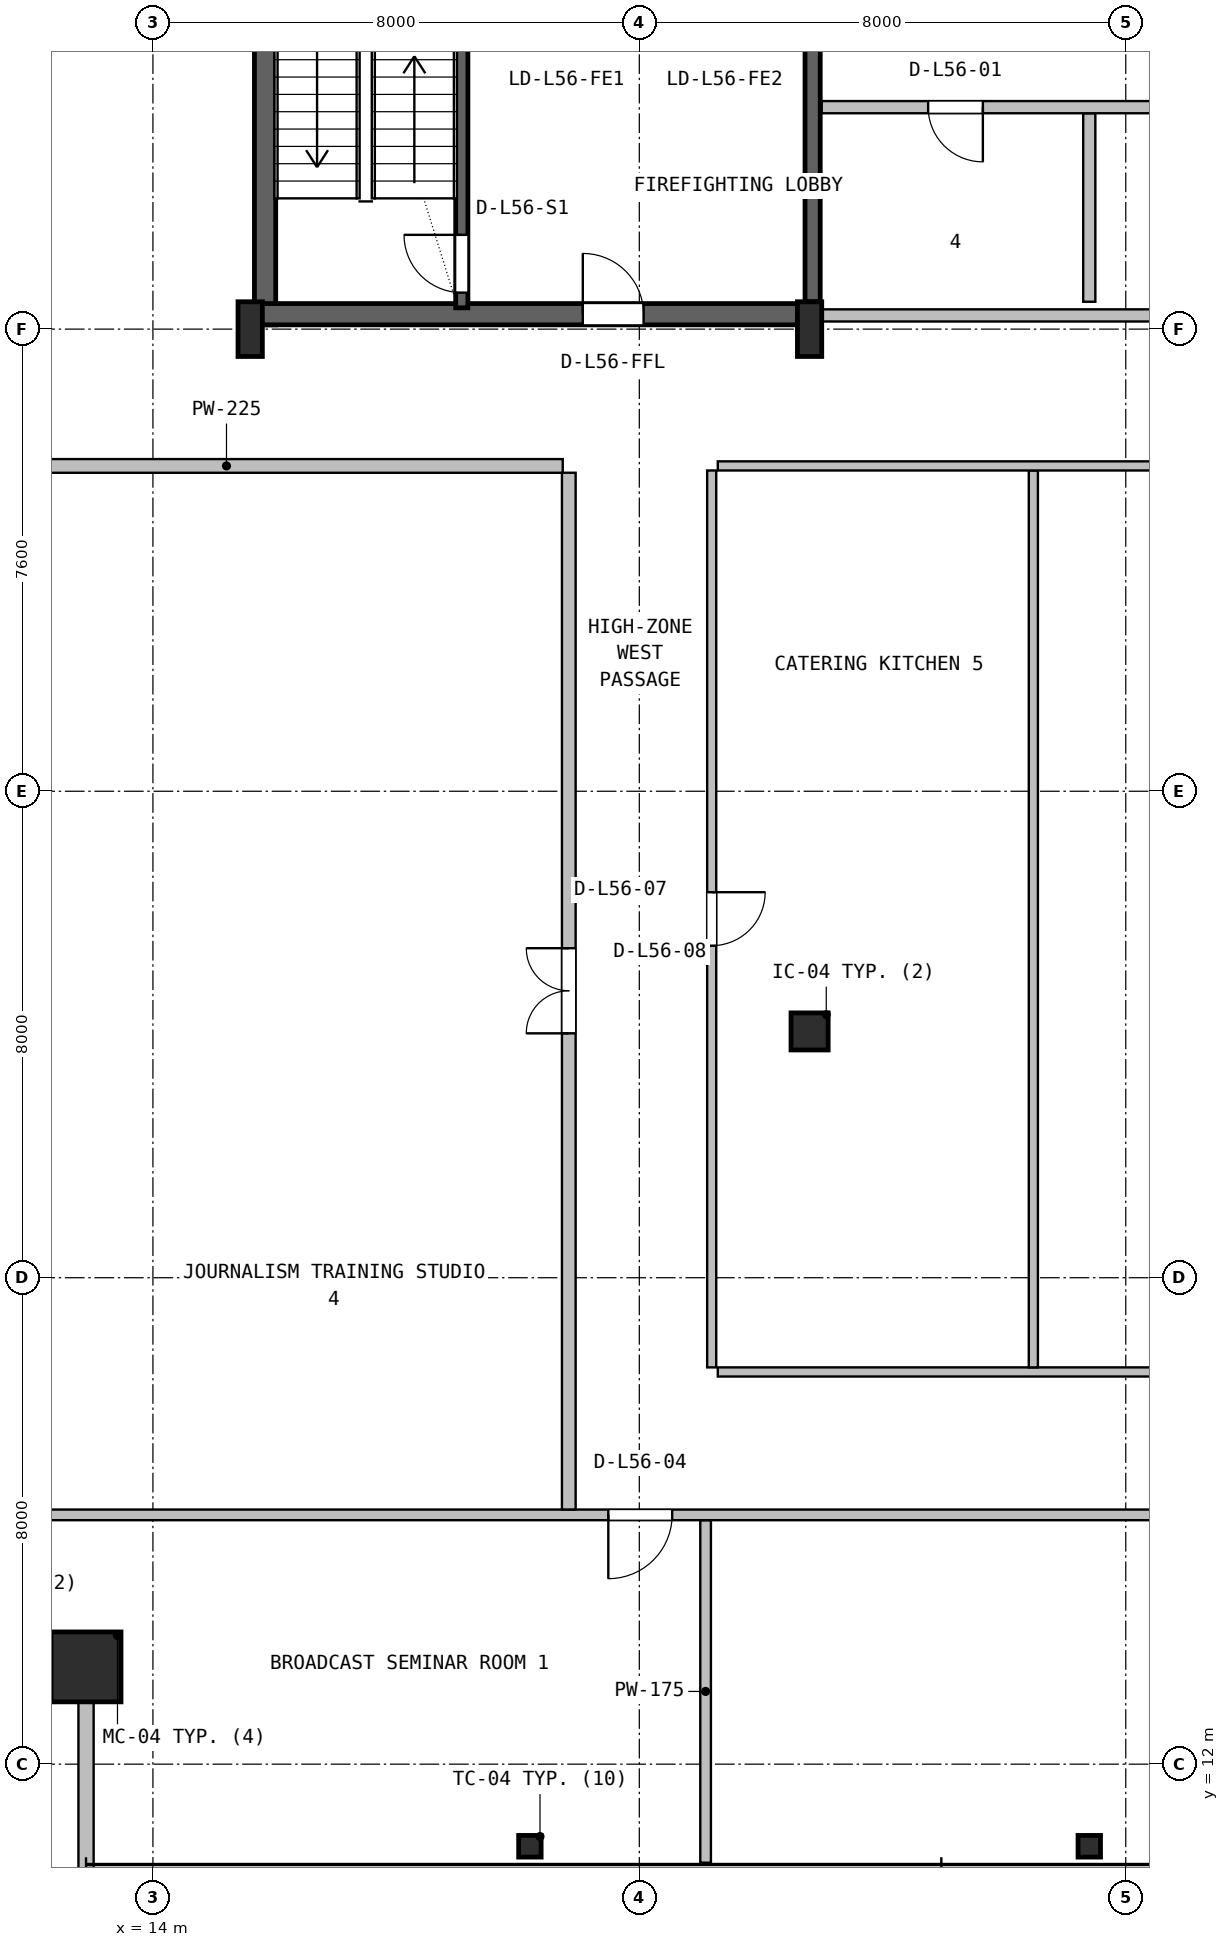
"""IFC4 building model, lengths in metres.
Left out: names, types, materials, properties, quantities, classifications, styles, units other than length and angle.
Written with IfcOpenShell. Run it as: python <this file> out.ifc"""

import sys

from ifc_helpers import new_model, si_unit, direction, frame, frame_2d, origin, origin_2d, place, context, subcontext, project, spatial, rectangle, hollow_rectangle, hollow_circle, i_section, extrude, source, transform, mapped, element, fill, save


model = new_model("IFC4")
c1 = context("Model", 3, precision=1e-05, world=origin(), true_north=direction((0.0, 1.0)))
c2 = subcontext(c1, "Body", "Model", "MODEL_VIEW")
j1 = project(units=[si_unit("LENGTHUNIT", "METRE"), si_unit("PLANEANGLEUNIT", "RADIAN")], contexts=[c1])
p1 = place(None, origin())
s1 = spatial("IfcSite", under=j1, at=p1, CompositionType="ELEMENT")
p2 = place(p1, origin())
s2 = spatial("IfcBuilding", under=s1, at=p2, CompositionType="ELEMENT")
p3 = place(p2, frame((0.0, 0.0, 226.4)))
s3 = spatial("IfcBuildingStorey", under=s2, at=p3, CompositionType="ELEMENT", Elevation=226.4)
p4 = place(p3, frame((15.845, 35.67, 0.0), z_axis=(0.0, 0.0, 1.0), x_axis=(0.0, 1.0, 0.0)))
e1 = element("IfcWall", 1, at=p4, inside=s3, PredefinedType="SHEAR", context=c2, shape_type="SweptSolid", body=[
    extrude(rectangle(XDim=11.13, YDim=0.35, at=frame_2d((5.565, 0.0))), origin(), (0.0, 0.0, 1.0), 3.55),
])
p5 = place(p3, frame((15.67, 35.845, 0.0), z_axis=(0.0, 0.0, 1.0), x_axis=(1.0, 0.0, 0.0)))
e2 = element("IfcWall", 2, at=p5, inside=s3, PredefinedType="SHEAR", context=c2, shape_type="SweptSolid", body=[
    extrude(rectangle(XDim=9.13, YDim=0.35, at=frame_2d((4.565, 0.0))), origin(), (0.0, 0.0, 1.0), 3.55),
])
p6 = place(p5, frame((5.4, 0.0, 0.0)))
e3 = element("IfcOpeningElement", 3, at=p6, cuts=e2, PredefinedType="OPENING", context=c2, shape_type="SweptSolid", body=[
    extrude(rectangle(XDim=1.0, YDim=2.1, at=frame_2d((0.5, 1.05))), frame((0.0, 0.185, 0.0), z_axis=(0.0, -1.0, 0.0), x_axis=(1.0, 0.0, 0.0)), (0.0, 0.0, 1.0), 0.37),
])
m1 = source(origin(), c2, "Body", "SweptSolid", [
    extrude(i_section(OverallWidth=0.4, OverallDepth=0.9, WebThickness=0.016, FlangeThickness=0.028, FilletRadius=0.016, at=origin_2d()), origin(), (0.0, 0.0, 1.0), 3.8),
])
for number, where, z_axis, x_axis in (
    (4, (15.6, 35.6, 0.0), (0.0, 0.0, 1.0), (1.0, 0.0, 0.0)),
    (5, (24.8, 35.6, 0.0), (0.0, 0.0, 1.0), (1.0, 0.0, 0.0)),
):
    element("IfcColumn", number, at=place(p3, frame(where, z_axis=z_axis, x_axis=x_axis)), inside=s3, PredefinedType="COLUMN", context=c2, shape_type="MappedRepresentation", body=[
        mapped(m1, transform((0.0, 0.0, 0.0), x_axis=(1.0, 0.0, 0.0), y_axis=(0.0, 1.0, 0.0), z_axis=(0.0, 0.0, 1.0), scale=1.0)),
    ])
m2 = source(origin(), c2, "Body", "SweptSolid", [
    extrude(hollow_rectangle(XDim=1.15, YDim=1.15, WallThickness=0.045, at=origin_2d()), origin(), (0.0, 0.0, 1.0), 3.8),
])
p7 = place(p3, frame((12.9, 13.6, 0.0), z_axis=(0.0, 0.0, 1.0), x_axis=(1.0, 0.0, 0.0)))
e6 = element("IfcColumn", 6, at=p7, inside=s3, PredefinedType="COLUMN", context=c2, shape_type="MappedRepresentation", body=[
    mapped(m2, transform((0.0, 0.0, 0.0), x_axis=(1.0, 0.0, 0.0), y_axis=(0.0, 1.0, 0.0), z_axis=(0.0, 0.0, 1.0), scale=1.0)),
])
m3 = source(origin(), c2, "Body", "SweptSolid", [
    extrude(i_section(OverallWidth=0.369, OverallDepth=0.356, WebThickness=0.011, FlangeThickness=0.018, FilletRadius=0.016, at=origin_2d()), origin(), (0.0, 0.0, 1.0), 3.8),
])
for number, where, z_axis, x_axis in (
    (7, (20.2, 10.65, 0.0), (0.0, 0.0, 1.0), (1.0, 0.0, 0.0)),
    (8, (29.4, 10.65, 0.0), (0.0, 0.0, 1.0), (1.0, 0.0, 0.0)),
):
    element("IfcColumn", number, at=place(p3, frame(where, z_axis=z_axis, x_axis=x_axis)), inside=s3, PredefinedType="COLUMN", context=c2, shape_type="MappedRepresentation", body=[
        mapped(m3, transform((0.0, 0.0, 0.0), x_axis=(1.0, 0.0, 0.0), y_axis=(0.0, 1.0, 0.0), z_axis=(0.0, 0.0, 1.0), scale=1.0)),
    ])
m4 = source(origin(), c2, "Body", "SweptSolid", [
    extrude(hollow_circle(Radius=0.305, WallThickness=0.025, at=origin_2d()), origin(), (0.0, 0.0, 1.0), 3.8),
])
p8 = place(p3, frame((24.8, 24.05, 0.0), z_axis=(0.0, 0.0, 1.0), x_axis=(1.0, 0.0, 0.0)))
e9 = element("IfcColumn", 9, at=p8, inside=s3, PredefinedType="COLUMN", context=c2, shape_type="MappedRepresentation", body=[
    mapped(m4, transform((0.0, 0.0, 0.0), x_axis=(1.0, 0.0, 0.0), y_axis=(0.0, 1.0, 0.0), z_axis=(0.0, 0.0, 1.0), scale=1.0)),
])
p9 = place(p3, frame((12.9, 10.28, 0.0), z_axis=(0.0, 0.0, 1.0), x_axis=(0.0, 1.0, 0.0)))
e10 = element("IfcWall", 10, at=p9, inside=s3, PredefinedType="SOLIDWALL", context=c2, shape_type="SweptSolid", body=[
    extrude(rectangle(XDim=3.4, YDim=0.25, at=frame_2d((1.7, 0.0))), origin(), (0.0, 0.0, 1.0), 3.171),
])
p10 = place(p3, frame((19.08, 35.95, 0.0), z_axis=(0.0, 0.0, 1.0), x_axis=(0.0, 1.0, 0.0)))
e11 = element("IfcWall", 11, at=p10, inside=s3, PredefinedType="SHEAR", context=c2, shape_type="SweptSolid", body=[
    extrude(rectangle(XDim=9.65, YDim=0.2, at=frame_2d((4.825, 0.0))), origin(), (0.0, 0.0, 1.0), 3.55),
])
p11 = place(p10, frame((0.25, 0.0, 0.0)))
e12 = element("IfcOpeningElement", 12, at=p11, cuts=e11, PredefinedType="OPENING", context=c2, shape_type="SweptSolid", body=[
    extrude(rectangle(XDim=0.95, YDim=2.1, at=frame_2d((0.475, 1.05))), frame((0.0, 0.11, 0.0), z_axis=(0.0, -1.0, 0.0), x_axis=(1.0, 0.0, 0.0)), (0.0, 0.0, 1.0), 0.22),
])
p12 = place(p3, frame((24.85, 36.05, 0.0), z_axis=(0.0, 0.0, 1.0), x_axis=(0.0, 1.0, 0.0)))
e13 = element("IfcWall", 13, at=p12, inside=s3, PredefinedType="SHEAR", context=c2, shape_type="SweptSolid", body=[
    extrude(rectangle(XDim=10.45, YDim=0.25, at=frame_2d((5.225, 0.0))), origin(), (0.0, 0.0, 1.0), 3.55),
])
p13 = place(p3, frame((25.0, 35.825, 0.0), z_axis=(0.0, 0.0, 1.0), x_axis=(1.0, 0.0, 0.0)))
e14 = element("IfcWall", 14, at=p13, inside=s3, PredefinedType="PLUMBINGWALL", context=c2, shape_type="SweptSolid", body=[
    extrude(rectangle(XDim=9.75, YDim=0.2, at=frame_2d((4.875, 0.0))), origin(), (0.0, 0.0, 1.0), 2.575),
])
p14 = place(p3, frame((29.4, 36.05, 0.0), z_axis=(0.0, 0.0, 1.0), x_axis=(0.0, 1.0, 0.0)))
e15 = element("IfcWall", 15, at=p14, inside=s3, PredefinedType="PLUMBINGWALL", context=c2, shape_type="SweptSolid", body=[
    extrude(rectangle(XDim=3.1, YDim=0.2, at=frame_2d((1.55, 0.0))), origin(), (0.0, 0.0, 1.0), 3.53),
])
p15 = place(p3, frame((25.0, 39.25, 0.0), z_axis=(0.0, 0.0, 1.0), x_axis=(1.0, 0.0, 0.0)))
e16 = element("IfcWall", 16, at=p15, inside=s3, PredefinedType="PLUMBINGWALL", context=c2, shape_type="SweptSolid", body=[
    extrude(rectangle(XDim=9.75, YDim=0.2, at=frame_2d((4.875, 0.0))), origin(), (0.0, 0.0, 1.0), 3.53),
])
p16 = place(p15, frame((1.75, 0.0, 0.0)))
e17 = element("IfcOpeningElement", 17, at=p16, cuts=e16, PredefinedType="OPENING", context=c2, shape_type="SweptSolid", body=[
    extrude(rectangle(XDim=0.9, YDim=2.06, at=frame_2d((0.45, 1.03))), frame((0.0, 0.11, 0.0), z_axis=(0.0, -1.0, 0.0), x_axis=(1.0, 0.0, 0.0)), (0.0, 0.0, 1.0), 0.22),
])
p17 = place(p15, frame((6.725, 0.0, 0.0)))
e18 = element("IfcOpeningElement", 18, at=p17, cuts=e16, PredefinedType="OPENING", context=c2, shape_type="SweptSolid", body=[
    extrude(rectangle(XDim=0.9, YDim=2.06, at=frame_2d((0.45, 1.03))), frame((0.0, 0.11, 0.0), z_axis=(0.0, -1.0, 0.0), x_axis=(1.0, 0.0, 0.0)), (0.0, 0.0, 1.0), 0.22),
])
p18 = place(p3, frame((23.09, 10.38, 0.0), z_axis=(0.0, 0.0, 1.0), x_axis=(0.0, 1.0, 0.0)))
e19 = element("IfcWall", 19, at=p18, inside=s3, PredefinedType="PARTITIONING", context=c2, shape_type="SweptSolid", body=[
    extrude(rectangle(XDim=5.633, YDim=0.175, at=frame_2d((2.816, 0.0))), origin(), (0.0, 0.0, 1.0), 3.171),
])
p19 = place(p3, frame((9.68, 16.1, 0.0), z_axis=(0.0, 0.0, 1.0), x_axis=(1.0, 0.0, 0.0)))
e20 = element("IfcWall", 20, at=p19, inside=s3, PredefinedType="PARTITIONING", context=c2, shape_type="SweptSolid", body=[
    extrude(rectangle(XDim=48.64, YDim=0.175, at=frame_2d((24.32, 0.0))), origin(), (0.0, 0.0, 1.0), 2.908),
])
p20 = place(p19, frame((11.81, 0.0, 0.0)))
e21 = element("IfcOpeningElement", 21, at=p20, cuts=e20, PredefinedType="OPENING", context=c2, shape_type="SweptSolid", body=[
    extrude(rectangle(XDim=1.05, YDim=2.1, at=frame_2d((0.525, 1.05))), frame((0.0, 0.098, 0.0), z_axis=(0.0, -1.0, 0.0), x_axis=(1.0, 0.0, 0.0)), (0.0, 0.0, 1.0), 0.195),
])
p21 = place(p19, frame((24.045, 0.0, 0.0)))
e22 = element("IfcOpeningElement", 22, at=p21, cuts=e20, PredefinedType="OPENING", context=c2, shape_type="SweptSolid", body=[
    extrude(rectangle(XDim=1.05, YDim=2.1, at=frame_2d((0.525, 1.05))), frame((0.0, 0.098, 0.0), z_axis=(0.0, -1.0, 0.0), x_axis=(1.0, 0.0, 0.0)), (0.0, 0.0, 1.0), 0.195),
])
p22 = place(p19, frame((36.28, 0.0, 0.0)))
e23 = element("IfcOpeningElement", 23, at=p22, cuts=e20, PredefinedType="OPENING", context=c2, shape_type="SweptSolid", body=[
    extrude(rectangle(XDim=1.05, YDim=2.1, at=frame_2d((0.525, 1.05))), frame((0.0, 0.098, 0.0), z_axis=(0.0, -1.0, 0.0), x_axis=(1.0, 0.0, 0.0)), (0.0, 0.0, 1.0), 0.195),
])
p23 = place(p3, frame((20.84, 16.188, 0.0), z_axis=(0.0, 0.0, 1.0), x_axis=(0.0, 1.0, 0.0)))
e24 = element("IfcWall", 24, at=p23, inside=s3, PredefinedType="PARTITIONING", context=c2, shape_type="SweptSolid", body=[
    extrude(rectangle(XDim=17.05, YDim=0.225, at=frame_2d((8.525, 0.0))), origin(), (0.0, 0.0, 1.0), 3.222),
])
p24 = place(p23, frame((7.831, 0.0, 0.0)))
e25 = element("IfcOpeningElement", 25, at=p24, cuts=e24, PredefinedType="OPENING", context=c2, shape_type="SweptSolid", body=[
    extrude(rectangle(XDim=1.4, YDim=2.12, at=frame_2d((0.7, 1.06))), frame((0.0, 0.123, 0.0), z_axis=(0.0, -1.0, 0.0), x_axis=(1.0, 0.0, 0.0)), (0.0, 0.0, 1.0), 0.245),
])
p25 = place(p3, frame((9.68, 33.35, 0.0), z_axis=(0.0, 0.0, 1.0), x_axis=(1.0, 0.0, 0.0)))
e26 = element("IfcWall", 26, at=p25, inside=s3, PredefinedType="PARTITIONING", context=c2, shape_type="SweptSolid", body=[
    extrude(rectangle(XDim=11.06, YDim=0.225, at=frame_2d((5.53, 0.0))), origin(), (0.0, 0.0, 1.0), 3.171),
])
p26 = place(p3, frame((23.29, 18.45, 0.0), z_axis=(0.0, 0.0, 1.0), x_axis=(1.0, 0.0, 0.0)))
e27 = element("IfcWall", 27, at=p26, inside=s3, PredefinedType="PARTITIONING", context=c2, shape_type="SweptSolid", body=[
    extrude(rectangle(XDim=21.92, YDim=0.15, at=frame_2d((10.96, 0.0))), origin(), (0.0, 0.0, 1.0), 2.908),
])
p27 = place(p26, frame((8.485, 0.0, 0.0)))
e28 = element("IfcOpeningElement", 28, at=p27, cuts=e27, PredefinedType="OPENING", context=c2, shape_type="SweptSolid", body=[
    extrude(rectangle(XDim=0.92, YDim=2.08, at=frame_2d((0.46, 1.04))), frame((0.0, 0.085, 0.0), z_axis=(0.0, -1.0, 0.0), x_axis=(1.0, 0.0, 0.0)), (0.0, 0.0, 1.0), 0.17),
])
p28 = place(p3, frame((28.48, 18.525, 0.0), z_axis=(0.0, 0.0, 1.0), x_axis=(0.0, 1.0, 0.0)))
e29 = element("IfcWall", 29, at=p28, inside=s3, PredefinedType="PARTITIONING", context=c2, shape_type="SweptSolid", body=[
    extrude(rectangle(XDim=14.75, YDim=0.15, at=frame_2d((7.375, 0.0))), origin(), (0.0, 0.0, 1.0), 2.908),
])
p29 = place(p3, frame((23.29, 33.35, 0.0), z_axis=(0.0, 0.0, 1.0), x_axis=(1.0, 0.0, 0.0)))
e30 = element("IfcWall", 30, at=p29, inside=s3, PredefinedType="PARTITIONING", context=c2, shape_type="SweptSolid", body=[
    extrude(rectangle(XDim=21.92, YDim=0.15, at=frame_2d((10.96, 0.0))), origin(), (0.0, 0.0, 1.0), 2.908),
])
p30 = place(p3, frame((23.19, 18.525, 0.0), z_axis=(0.0, 0.0, 1.0), x_axis=(0.0, 1.0, 0.0)))
e31 = element("IfcWall", 31, at=p30, inside=s3, PredefinedType="PARTITIONING", context=c2, shape_type="SweptSolid", body=[
    extrude(rectangle(XDim=14.75, YDim=0.15, at=frame_2d((7.375, 0.0))), origin(), (0.0, 0.0, 1.0), 3.222),
])
p31 = place(p30, frame((6.935, 0.0, 0.0)))
e32 = element("IfcOpeningElement", 32, at=p31, cuts=e31, PredefinedType="OPENING", context=c2, shape_type="SweptSolid", body=[
    extrude(rectangle(XDim=0.88, YDim=2.06, at=frame_2d((0.44, 1.03))), frame((0.0, 0.085, 0.0), z_axis=(0.0, -1.0, 0.0), x_axis=(1.0, 0.0, 0.0)), (0.0, 0.0, 1.0), 0.17),
])
m5 = source(origin(), c2, "Body", "SweptSolid", [
    extrude(rectangle(XDim=0.95, YDim=2.1, at=frame_2d((0.475, 1.05))), frame((0.0, 0.025, 0.0), z_axis=(0.0, -1.0, 0.0), x_axis=(1.0, 0.0, 0.0)), (0.0, 0.0, 1.0), 0.05),
])
p32 = place(p11, origin())
e33 = element("IfcDoor", 33, at=p32, inside=s3, OperationType="SINGLE_SWING_RIGHT", PredefinedType="DOOR", context=c2, shape_type="MappedRepresentation", body=[
    mapped(m5, transform((0.0, 0.0, 0.0), x_axis=(1.0, 0.0, 0.0), y_axis=(0.0, 1.0, 0.0), z_axis=(0.0, 0.0, 1.0), scale=1.0)),
])
fill(e12, e33)
m6 = source(origin(), c2, "Body", "SweptSolid", [
    extrude(rectangle(XDim=1.0, YDim=2.1, at=frame_2d((0.5, 1.05))), frame((0.0, 0.025, 0.0), z_axis=(0.0, -1.0, 0.0), x_axis=(1.0, 0.0, 0.0)), (0.0, 0.0, 1.0), 0.05),
])
p33 = place(p6, origin())
e34 = element("IfcDoor", 34, at=p33, inside=s3, OperationType="SINGLE_SWING_LEFT", PredefinedType="DOOR", context=c2, shape_type="MappedRepresentation", body=[
    mapped(m6, transform((0.0, 0.0, 0.0), x_axis=(1.0, 0.0, 0.0), y_axis=(0.0, 1.0, 0.0), z_axis=(0.0, 0.0, 1.0), scale=1.0)),
])
fill(e3, e34)
m7 = source(origin(), c2, "Body", "SweptSolid", [
    extrude(rectangle(XDim=0.9, YDim=2.06, at=frame_2d((0.45, 1.03))), frame((0.0, 0.025, 0.0), z_axis=(0.0, -1.0, 0.0), x_axis=(1.0, 0.0, 0.0)), (0.0, 0.0, 1.0), 0.05),
])
p34 = place(p16, frame((0.9, 0.0, 0.0), z_axis=(0.0, 0.0, 1.0), x_axis=(-1.0, 0.0, 0.0)))
e35 = element("IfcDoor", 35, at=p34, inside=s3, OperationType="SINGLE_SWING_RIGHT", PredefinedType="DOOR", context=c2, shape_type="MappedRepresentation", body=[
    mapped(m7, transform((0.0, 0.0, 0.0), x_axis=(1.0, 0.0, 0.0), y_axis=(0.0, 1.0, 0.0), z_axis=(0.0, 0.0, 1.0), scale=1.0)),
])
fill(e17, e35)
m8 = source(origin(), c2, "Body", "SweptSolid", [
    extrude(rectangle(XDim=1.05, YDim=2.1, at=frame_2d((0.525, 1.05))), frame((0.0, 0.025, 0.0), z_axis=(0.0, -1.0, 0.0), x_axis=(1.0, 0.0, 0.0)), (0.0, 0.0, 1.0), 0.05),
])
p35 = place(p20, frame((1.05, 0.0, 0.0), z_axis=(0.0, 0.0, 1.0), x_axis=(-1.0, 0.0, 0.0)))
e36 = element("IfcDoor", 36, at=p35, inside=s3, OperationType="SINGLE_SWING_LEFT", PredefinedType="DOOR", context=c2, shape_type="MappedRepresentation", body=[
    mapped(m8, transform((0.0, 0.0, 0.0), x_axis=(1.0, 0.0, 0.0), y_axis=(0.0, 1.0, 0.0), z_axis=(0.0, 0.0, 1.0), scale=1.0)),
])
fill(e21, e36)
m9 = source(origin(), c2, "Body", "SweptSolid", [
    extrude(rectangle(XDim=1.4, YDim=2.12, at=frame_2d((0.7, 1.06))), frame((0.0, 0.025, 0.0), z_axis=(0.0, -1.0, 0.0), x_axis=(1.0, 0.0, 0.0)), (0.0, 0.0, 1.0), 0.05),
])
p36 = place(p24, origin())
e37 = element("IfcDoor", 37, at=p36, inside=s3, OperationType="DOUBLE_DOOR_SINGLE_SWING", PredefinedType="DOOR", context=c2, shape_type="MappedRepresentation", body=[
    mapped(m9, transform((0.0, 0.0, 0.0), x_axis=(1.0, 0.0, 0.0), y_axis=(0.0, 1.0, 0.0), z_axis=(0.0, 0.0, 1.0), scale=1.0)),
])
fill(e25, e37)
m10 = source(origin(), c2, "Body", "SweptSolid", [
    extrude(rectangle(XDim=0.88, YDim=2.06, at=frame_2d((0.44, 1.03))), frame((0.0, 0.025, 0.0), z_axis=(0.0, -1.0, 0.0), x_axis=(1.0, 0.0, 0.0)), (0.0, 0.0, 1.0), 0.05),
])
p37 = place(p31, frame((0.88, 0.0, 0.0), z_axis=(0.0, 0.0, 1.0), x_axis=(-1.0, 0.0, 0.0)))
e38 = element("IfcDoor", 38, at=p37, inside=s3, OperationType="SINGLE_SWING_RIGHT", PredefinedType="DOOR", context=c2, shape_type="MappedRepresentation", body=[
    mapped(m10, transform((0.0, 0.0, 0.0), x_axis=(1.0, 0.0, 0.0), y_axis=(0.0, 1.0, 0.0), z_axis=(0.0, 0.0, 1.0), scale=1.0)),
])
fill(e32, e38)
save(model, sys.argv[1])
